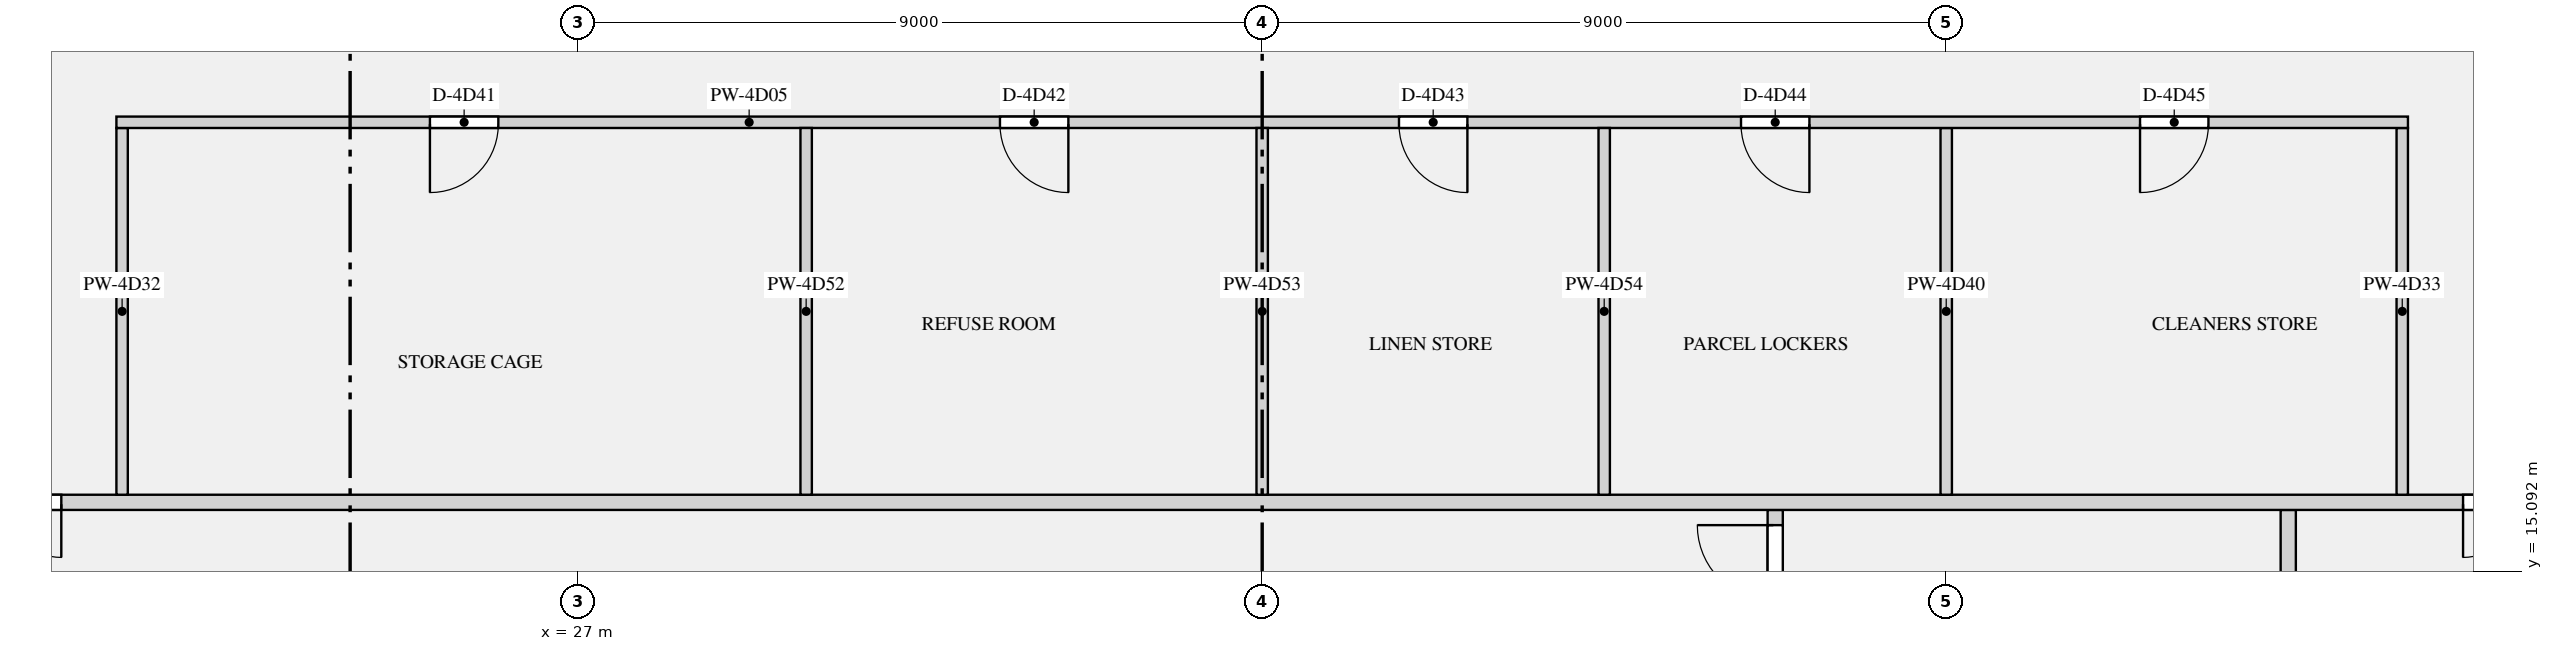
"""IFC4 building model, lengths in metres.
Left out: names, types, materials, properties, quantities, classifications, styles, units other than length and angle.
Written with IfcOpenShell. Run it as: python <this file> out.ifc"""

import sys

from ifc_helpers import new_model, si_unit, direction, frame, frame_2d, origin, place, context, subcontext, project, spatial, rectangle, extrude, element, fill, save


model = new_model("IFC4")
c1 = context("Model", 3, precision=1e-05, world=origin(), true_north=direction((0.0, 1.0)))
c2 = subcontext(c1, "Body", "Model", "MODEL_VIEW")
j1 = project(units=[si_unit("LENGTHUNIT", "METRE"), si_unit("PLANEANGLEUNIT", "RADIAN")], contexts=[c1])
p1 = place(None, origin())
s1 = spatial("IfcSite", under=j1, at=p1, CompositionType="ELEMENT")
p2 = place(p1, origin())
s2 = spatial("IfcBuilding", under=s1, at=p2, CompositionType="ELEMENT")
p3 = place(p2, frame((0.0, 0.0, 223.2)))
s3 = spatial("IfcBuildingStorey", under=s2, at=p3, CompositionType="ELEMENT", Elevation=223.2)
p4 = place(p3, frame((42.75, 12.5, 0.0), z_axis=(0.0, 0.0, 1.0), x_axis=(0.0, 1.0, 0.0)))
e1 = element("IfcWall", 1, at=p4, inside=s3, PredefinedType="PARTITIONING", context=c2, shape_type="SweptSolid", body=[
    extrude(rectangle(XDim=3.4, YDim=0.2, at=frame_2d((1.7, 0.0))), origin(), (0.0, 0.0, 1.0), 2.83),
])
p5 = place(p4, frame((2.2, 0.0, 0.0)))
e2 = element("IfcOpeningElement", 2, at=p5, cuts=e1, PredefinedType="OPENING", context=c2, shape_type="SweptSolid", body=[
    extrude(rectangle(XDim=1.0, YDim=2.1, at=frame_2d((0.5, 1.05))), frame((0.0, 0.11, 0.0), z_axis=(0.0, -1.0, 0.0), x_axis=(1.0, 0.0, 0.0)), (0.0, 0.0, 1.0), 0.22),
])
p6 = place(p3, frame((49.5, 12.5, 0.0), z_axis=(0.0, 0.0, 1.0), x_axis=(0.0, 1.0, 0.0)))
e3 = element("IfcWall", 3, at=p6, inside=s3, PredefinedType="PARTITIONING", context=c2, shape_type="SweptSolid", body=[
    extrude(rectangle(XDim=3.4, YDim=0.2, at=frame_2d((1.7, 0.0))), origin(), (0.0, 0.0, 1.0), 2.83),
])
p7 = place(p6, frame((1.15, 0.0, 0.0)))
e4 = element("IfcOpeningElement", 4, at=p7, cuts=e3, PredefinedType="OPENING", context=c2, shape_type="SweptSolid", body=[
    extrude(rectangle(XDim=1.1, YDim=2.1, at=frame_2d((0.55, 1.05))), frame((0.0, 0.11, 0.0), z_axis=(0.0, -1.0, 0.0), x_axis=(1.0, 0.0, 0.0)), (0.0, 0.0, 1.0), 0.22),
])
p8 = place(p3, frame((20.925, 21.0, 0.0), z_axis=(0.0, 0.0, 1.0), x_axis=(1.0, 0.0, 0.0)))
e5 = element("IfcWall", 5, at=p8, inside=s3, PredefinedType="PARTITIONING", context=c2, shape_type="SweptSolid", body=[
    extrude(rectangle(XDim=30.15, YDim=0.15, at=frame_2d((15.075, 0.0))), origin(), (0.0, 0.0, 1.0), 2.83),
])
p9 = place(p8, frame((4.125, 0.0, 0.0)))
e6 = element("IfcOpeningElement", 6, at=p9, cuts=e5, PredefinedType="OPENING", context=c2, shape_type="SweptSolid", body=[
    extrude(rectangle(XDim=0.9, YDim=2.1, at=frame_2d((0.45, 1.05))), frame((0.0, 0.085, 0.0), z_axis=(0.0, -1.0, 0.0), x_axis=(1.0, 0.0, 0.0)), (0.0, 0.0, 1.0), 0.17),
])
p10 = place(p8, frame((11.625, 0.0, 0.0)))
e7 = element("IfcOpeningElement", 7, at=p10, cuts=e5, PredefinedType="OPENING", context=c2, shape_type="SweptSolid", body=[
    extrude(rectangle(XDim=0.9, YDim=2.1, at=frame_2d((0.45, 1.05))), frame((0.0, 0.085, 0.0), z_axis=(0.0, -1.0, 0.0), x_axis=(1.0, 0.0, 0.0)), (0.0, 0.0, 1.0), 0.17),
])
p11 = place(p8, frame((16.875, 0.0, 0.0)))
e8 = element("IfcOpeningElement", 8, at=p11, cuts=e5, PredefinedType="OPENING", context=c2, shape_type="SweptSolid", body=[
    extrude(rectangle(XDim=0.9, YDim=2.1, at=frame_2d((0.45, 1.05))), frame((0.0, 0.085, 0.0), z_axis=(0.0, -1.0, 0.0), x_axis=(1.0, 0.0, 0.0)), (0.0, 0.0, 1.0), 0.17),
])
p12 = place(p8, frame((21.375, 0.0, 0.0)))
e9 = element("IfcOpeningElement", 9, at=p12, cuts=e5, PredefinedType="OPENING", context=c2, shape_type="SweptSolid", body=[
    extrude(rectangle(XDim=0.9, YDim=2.1, at=frame_2d((0.45, 1.05))), frame((0.0, 0.085, 0.0), z_axis=(0.0, -1.0, 0.0), x_axis=(1.0, 0.0, 0.0)), (0.0, 0.0, 1.0), 0.17),
])
p13 = place(p8, frame((26.625, 0.0, 0.0)))
e10 = element("IfcOpeningElement", 10, at=p13, cuts=e5, PredefinedType="OPENING", context=c2, shape_type="SweptSolid", body=[
    extrude(rectangle(XDim=0.9, YDim=2.1, at=frame_2d((0.45, 1.05))), frame((0.0, 0.085, 0.0), z_axis=(0.0, -1.0, 0.0), x_axis=(1.0, 0.0, 0.0)), (0.0, 0.0, 1.0), 0.17),
])
p14 = place(p3, frame((17.9, 16.0, 0.0), z_axis=(0.0, 0.0, 1.0), x_axis=(1.0, 0.0, 0.0)))
e11 = element("IfcWall", 11, at=p14, inside=s3, PredefinedType="PARTITIONING", context=c2, shape_type="SweptSolid", body=[
    extrude(rectangle(XDim=36.2, YDim=0.2, at=frame_2d((18.1, 0.0))), origin(), (0.0, 0.0, 1.0), 2.83),
])
p15 = place(p14, frame((0.9, 0.0, 0.0)))
e12 = element("IfcOpeningElement", 12, at=p15, cuts=e11, PredefinedType="OPENING", context=c2, shape_type="SweptSolid", body=[
    extrude(rectangle(XDim=1.4, YDim=2.1, at=frame_2d((0.7, 1.05))), frame((0.0, 0.11, 0.0), z_axis=(0.0, -1.0, 0.0), x_axis=(1.0, 0.0, 0.0)), (0.0, 0.0, 1.0), 0.22),
])
p16 = place(p14, frame((33.9, 0.0, 0.0)))
e13 = element("IfcOpeningElement", 13, at=p16, cuts=e11, PredefinedType="OPENING", context=c2, shape_type="SweptSolid", body=[
    extrude(rectangle(XDim=1.4, YDim=2.1, at=frame_2d((0.7, 1.05))), frame((0.0, 0.11, 0.0), z_axis=(0.0, -1.0, 0.0), x_axis=(1.0, 0.0, 0.0)), (0.0, 0.0, 1.0), 0.22),
])
for number, where, z_axis, x_axis in (
    (14, (21.0, 16.1, 0.0), (0.0, 0.0, 1.0), (0.0, 1.0, 0.0)),
    (15, (51.0, 16.1, 0.0), (0.0, 0.0, 1.0), (0.0, 1.0, 0.0)),
    (16, (45.0, 16.1, 0.0), (0.0, 0.0, 1.0), (0.0, 1.0, 0.0)),
    (17, (30.0, 16.1, 0.0), (0.0, 0.0, 1.0), (0.0, 1.0, 0.0)),
    (18, (36.0, 16.1, 0.0), (0.0, 0.0, 1.0), (0.0, 1.0, 0.0)),
    (19, (40.5, 16.1, 0.0), (0.0, 0.0, 1.0), (0.0, 1.0, 0.0)),
):
    element("IfcWall", number, at=place(p3, frame(where, z_axis=z_axis, x_axis=x_axis)), inside=s3, PredefinedType="PARTITIONING", context=c2, shape_type="SweptSolid", body=[
        extrude(rectangle(XDim=4.825, YDim=0.15, at=frame_2d((2.413, 0.0))), origin(), (0.0, 0.0, 1.0), 2.83),
    ])
p17 = place(p5, origin())
e20 = element("IfcDoor", 20, at=p17, inside=s3, OperationType="SINGLE_SWING_RIGHT", PredefinedType="DOOR", context=c2, shape_type="SweptSolid", body=[
    extrude(rectangle(XDim=1.0, YDim=2.1, at=frame_2d((0.5, 1.05))), frame((0.0, 0.025, 0.0), z_axis=(0.0, -1.0, 0.0), x_axis=(1.0, 0.0, 0.0)), (0.0, 0.0, 1.0), 0.05),
])
fill(e2, e20)
p18 = place(p15, frame((1.4, 0.0, 0.0), z_axis=(0.0, 0.0, 1.0), x_axis=(-1.0, 0.0, 0.0)))
e21 = element("IfcDoor", 21, at=p18, inside=s3, OperationType="DOUBLE_DOOR_SINGLE_SWING", PredefinedType="DOOR", context=c2, shape_type="SweptSolid", body=[
    extrude(rectangle(XDim=1.4, YDim=2.1, at=frame_2d((0.7, 1.05))), frame((0.0, 0.025, 0.0), z_axis=(0.0, -1.0, 0.0), x_axis=(1.0, 0.0, 0.0)), (0.0, 0.0, 1.0), 0.05),
])
fill(e12, e21)
p19 = place(p16, frame((1.4, 0.0, 0.0), z_axis=(0.0, 0.0, 1.0), x_axis=(-1.0, 0.0, 0.0)))
e22 = element("IfcDoor", 22, at=p19, inside=s3, OperationType="DOUBLE_DOOR_SINGLE_SWING", PredefinedType="DOOR", context=c2, shape_type="SweptSolid", body=[
    extrude(rectangle(XDim=1.4, YDim=2.1, at=frame_2d((0.7, 1.05))), frame((0.0, 0.025, 0.0), z_axis=(0.0, -1.0, 0.0), x_axis=(1.0, 0.0, 0.0)), (0.0, 0.0, 1.0), 0.05),
])
fill(e13, e22)
p20 = place(p9, frame((0.9, 0.0, 0.0), z_axis=(0.0, 0.0, 1.0), x_axis=(-1.0, 0.0, 0.0)))
e23 = element("IfcDoor", 23, at=p20, inside=s3, OperationType="SINGLE_SWING_RIGHT", PredefinedType="DOOR", context=c2, shape_type="SweptSolid", body=[
    extrude(rectangle(XDim=0.9, YDim=2.1, at=frame_2d((0.45, 1.05))), frame((0.0, 0.025, 0.0), z_axis=(0.0, -1.0, 0.0), x_axis=(1.0, 0.0, 0.0)), (0.0, 0.0, 1.0), 0.05),
])
fill(e6, e23)
p21 = place(p10, frame((0.9, 0.0, 0.0), z_axis=(0.0, 0.0, 1.0), x_axis=(-1.0, 0.0, 0.0)))
e24 = element("IfcDoor", 24, at=p21, inside=s3, OperationType="SINGLE_SWING_LEFT", PredefinedType="DOOR", context=c2, shape_type="SweptSolid", body=[
    extrude(rectangle(XDim=0.9, YDim=2.1, at=frame_2d((0.45, 1.05))), frame((0.0, 0.025, 0.0), z_axis=(0.0, -1.0, 0.0), x_axis=(1.0, 0.0, 0.0)), (0.0, 0.0, 1.0), 0.05),
])
fill(e7, e24)
p22 = place(p11, frame((0.9, 0.0, 0.0), z_axis=(0.0, 0.0, 1.0), x_axis=(-1.0, 0.0, 0.0)))
e25 = element("IfcDoor", 25, at=p22, inside=s3, OperationType="SINGLE_SWING_LEFT", PredefinedType="DOOR", context=c2, shape_type="SweptSolid", body=[
    extrude(rectangle(XDim=0.9, YDim=2.1, at=frame_2d((0.45, 1.05))), frame((0.0, 0.025, 0.0), z_axis=(0.0, -1.0, 0.0), x_axis=(1.0, 0.0, 0.0)), (0.0, 0.0, 1.0), 0.05),
])
fill(e8, e25)
p23 = place(p12, frame((0.9, 0.0, 0.0), z_axis=(0.0, 0.0, 1.0), x_axis=(-1.0, 0.0, 0.0)))
e26 = element("IfcDoor", 26, at=p23, inside=s3, OperationType="SINGLE_SWING_LEFT", PredefinedType="DOOR", context=c2, shape_type="SweptSolid", body=[
    extrude(rectangle(XDim=0.9, YDim=2.1, at=frame_2d((0.45, 1.05))), frame((0.0, 0.025, 0.0), z_axis=(0.0, -1.0, 0.0), x_axis=(1.0, 0.0, 0.0)), (0.0, 0.0, 1.0), 0.05),
])
fill(e9, e26)
p24 = place(p13, frame((0.9, 0.0, 0.0), z_axis=(0.0, 0.0, 1.0), x_axis=(-1.0, 0.0, 0.0)))
e27 = element("IfcDoor", 27, at=p24, inside=s3, OperationType="SINGLE_SWING_RIGHT", PredefinedType="DOOR", context=c2, shape_type="SweptSolid", body=[
    extrude(rectangle(XDim=0.9, YDim=2.1, at=frame_2d((0.45, 1.05))), frame((0.0, 0.025, 0.0), z_axis=(0.0, -1.0, 0.0), x_axis=(1.0, 0.0, 0.0)), (0.0, 0.0, 1.0), 0.05),
])
fill(e10, e27)
save(model, sys.argv[1])
